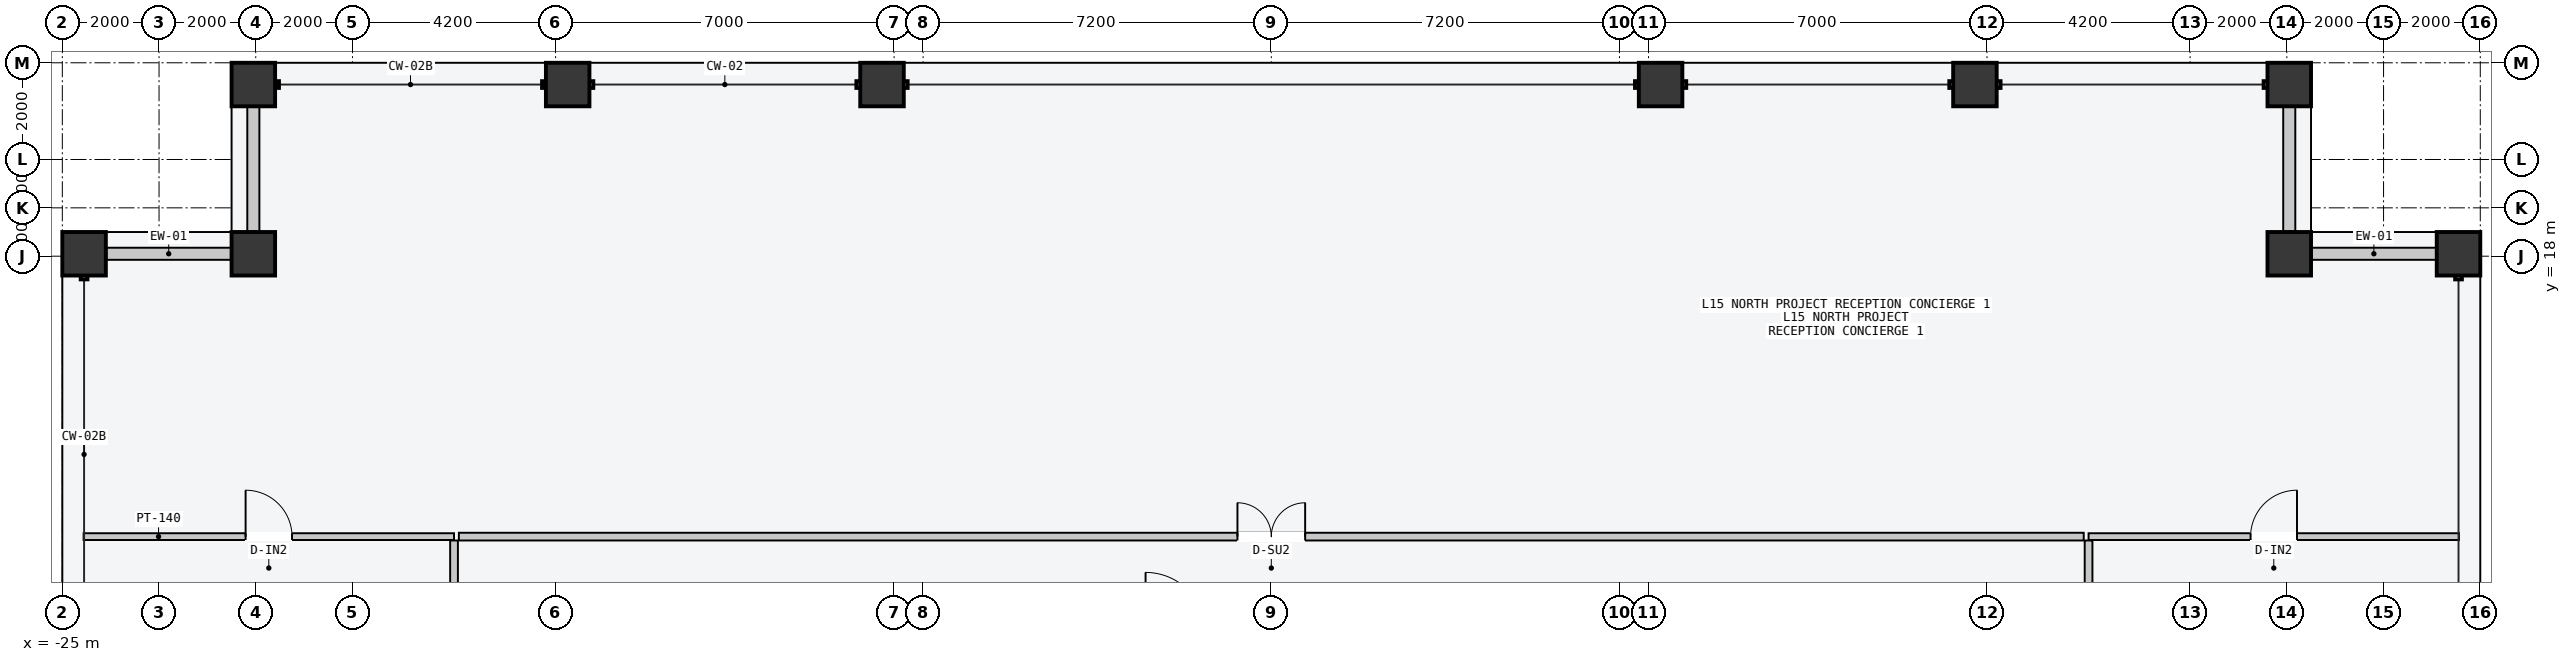
"""IFC4 building model, lengths in metres.
Left out: names, types, materials, properties, quantities, classifications, styles, units other than length and angle.
Written with IfcOpenShell. Run it as: python <this file> out.ifc"""

import sys

from ifc_helpers import new_model, si_unit, direction, frame, frame_2d, origin, origin_2d, place, context, subcontext, project, spatial, rectangle, hollow_rectangle, extrude, element, fill, save


model = new_model("IFC4")
c1 = context("Model", 3, precision=1e-05, world=origin(), true_north=direction((0.0, 1.0)))
c2 = subcontext(c1, "Body", "Model", "MODEL_VIEW")
j1 = project(units=[si_unit("LENGTHUNIT", "METRE"), si_unit("PLANEANGLEUNIT", "RADIAN")], contexts=[c1])
p1 = place(None, origin())
s1 = spatial("IfcSite", under=j1, at=p1, CompositionType="ELEMENT")
p2 = place(p1, origin())
s2 = spatial("IfcBuilding", under=s1, at=p2, CompositionType="ELEMENT")
p3 = place(p2, frame((0.0, 0.0, 60.0)))
s3 = spatial("IfcBuildingStorey", under=s2, at=p3, CompositionType="ELEMENT", Elevation=60.0)
for number, where, z_axis, x_axis in (
    (1, (-21.05, 21.55, 0.0), (0.0, 0.0, 1.0), (1.0, 0.0, 0.0)),
    (2, (-14.55, 21.55, 0.0), (0.0, 0.0, 1.0), (1.0, 0.0, 0.0)),
    (3, (-8.05, 21.55, 0.0), (0.0, 0.0, 1.0), (1.0, 0.0, 0.0)),
    (4, (8.05, 21.55, 0.0), (0.0, 0.0, 1.0), (1.0, 0.0, 0.0)),
    (5, (14.55, 21.55, 0.0), (0.0, 0.0, 1.0), (1.0, 0.0, 0.0)),
    (6, (21.05, 21.55, 0.0), (0.0, 0.0, 1.0), (1.0, 0.0, 0.0)),
    (7, (-24.55, 18.05, 0.0), (0.0, 0.0, 1.0), (0.0, 1.0, 0.0)),
    (8, (24.55, 18.05, 0.0), (0.0, 0.0, 1.0), (0.0, 1.0, 0.0)),
    (9, (-21.05, 18.05, 0.0), (0.0, 0.0, 1.0), (1.0, 0.0, 0.0)),
    (10, (21.05, 18.05, 0.0), (0.0, 0.0, 1.0), (1.0, 0.0, 0.0)),
):
    element("IfcColumn", number, at=place(p3, frame(where, z_axis=z_axis, x_axis=x_axis)), inside=s3, PredefinedType="COLUMN", context=c2, shape_type="SweptSolid", body=[
        extrude(hollow_rectangle(XDim=0.9, YDim=0.9, WallThickness=0.045, at=origin_2d()), origin(), (0.0, 0.0, 1.0), 3.6),
    ])
for number, where, z_axis, x_axis in (
    (11, (-24.09, 18.05, 0.0), (0.0, 0.0, 1.0), (1.0, 0.0, 0.0)),
    (12, (-21.05, 18.51, 0.0), (0.0, 0.0, 1.0), (0.0, 1.0, 0.0)),
    (13, (21.51, 18.05, 0.0), (0.0, 0.0, 1.0), (1.0, 0.0, 0.0)),
    (14, (21.05, 18.51, 0.0), (0.0, 0.0, 1.0), (0.0, 1.0, 0.0)),
):
    element("IfcWall", number, at=place(p3, frame(where, z_axis=z_axis, x_axis=x_axis)), inside=s3, PredefinedType="STANDARD", context=c2, shape_type="SweptSolid", body=[
        extrude(rectangle(XDim=2.58, YDim=0.25, at=frame_2d((1.29, 0.0))), origin(), (0.0, 0.0, 1.0), 2.7),
    ])
p4 = place(p3, frame((-16.8, 12.2, 0.0), z_axis=(0.0, 0.0, 1.0), x_axis=(1.0, 0.0, 0.0)))
e15 = element("IfcWall", 15, at=p4, inside=s3, PredefinedType="PARTITIONING", context=c2, shape_type="SweptSolid", body=[
    extrude(rectangle(XDim=33.6, YDim=0.16, at=frame_2d((16.8, 0.0))), origin(), (0.0, 0.0, 1.0), 3.4),
])
p5 = place(p4, frame((16.1, 0.0, 0.0)))
e16 = element("IfcOpeningElement", 16, at=p5, cuts=e15, PredefinedType="OPENING", context=c2, shape_type="SweptSolid", body=[
    extrude(rectangle(XDim=1.4, YDim=2.2, at=frame_2d((0.7, 1.1))), frame((0.0, 0.09, 0.0), z_axis=(0.0, -1.0, 0.0), x_axis=(1.0, 0.0, 0.0)), (0.0, 0.0, 1.0), 0.18),
])
p6 = place(p3, frame((-24.56, 12.2, 0.0), z_axis=(0.0, 0.0, 1.0), x_axis=(1.0, 0.0, 0.0)))
e17 = element("IfcWall", 17, at=p6, inside=s3, PredefinedType="PARTITIONING", context=c2, shape_type="SweptSolid", body=[
    extrude(rectangle(XDim=7.66, YDim=0.14, at=frame_2d((3.83, 0.0))), origin(), (0.0, 0.0, 1.0), 3.4),
])
p7 = place(p6, frame((3.35, 0.0, 0.0)))
e18 = element("IfcOpeningElement", 18, at=p7, cuts=e17, PredefinedType="OPENING", context=c2, shape_type="SweptSolid", body=[
    extrude(rectangle(XDim=0.96, YDim=2.18, at=frame_2d((0.48, 1.09))), frame((0.0, 0.08, 0.0), z_axis=(0.0, -1.0, 0.0), x_axis=(1.0, 0.0, 0.0)), (0.0, 0.0, 1.0), 0.16),
])
p8 = place(p3, frame((16.9, 12.2, 0.0), z_axis=(0.0, 0.0, 1.0), x_axis=(1.0, 0.0, 0.0)))
e19 = element("IfcWall", 19, at=p8, inside=s3, PredefinedType="PARTITIONING", context=c2, shape_type="SweptSolid", body=[
    extrude(rectangle(XDim=7.66, YDim=0.14, at=frame_2d((3.83, 0.0))), origin(), (0.0, 0.0, 1.0), 3.4),
])
p9 = place(p8, frame((3.35, 0.0, 0.0)))
e20 = element("IfcOpeningElement", 20, at=p9, cuts=e19, PredefinedType="OPENING", context=c2, shape_type="SweptSolid", body=[
    extrude(rectangle(XDim=0.96, YDim=2.18, at=frame_2d((0.48, 1.09))), frame((0.0, 0.08, 0.0), z_axis=(0.0, -1.0, 0.0), x_axis=(1.0, 0.0, 0.0)), (0.0, 0.0, 1.0), 0.16),
])
p10 = place(p3, frame((-16.9, -14.42, 0.0), z_axis=(0.0, 0.0, 1.0), x_axis=(0.0, 1.0, 0.0)))
e21 = element("IfcWall", 21, at=p10, inside=s3, PredefinedType="PARTITIONING", context=c2, shape_type="SweptSolid", body=[
    extrude(rectangle(XDim=26.54, YDim=0.16, at=frame_2d((13.27, 0.0))), origin(), (0.0, 0.0, 1.0), 3.4),
])
p11 = place(p10, frame((5.123, 0.0, 0.0)))
e22 = element("IfcOpeningElement", 22, at=p11, cuts=e21, PredefinedType="OPENING", context=c2, shape_type="SweptSolid", body=[
    extrude(rectangle(XDim=0.9, YDim=2.15, at=frame_2d((0.45, 1.075))), frame((0.0, 0.09, 0.0), z_axis=(0.0, -1.0, 0.0), x_axis=(1.0, 0.0, 0.0)), (0.0, 0.0, 1.0), 0.18),
])
p12 = place(p10, frame((18.363, 0.0, 0.0)))
e23 = element("IfcOpeningElement", 23, at=p12, cuts=e21, PredefinedType="OPENING", context=c2, shape_type="SweptSolid", body=[
    extrude(rectangle(XDim=0.96, YDim=2.18, at=frame_2d((0.48, 1.09))), frame((0.0, 0.09, 0.0), z_axis=(0.0, -1.0, 0.0), x_axis=(1.0, 0.0, 0.0)), (0.0, 0.0, 1.0), 0.18),
])
p13 = place(p3, frame((16.9, -14.42, 0.0), z_axis=(0.0, 0.0, 1.0), x_axis=(0.0, 1.0, 0.0)))
e24 = element("IfcWall", 24, at=p13, inside=s3, PredefinedType="PARTITIONING", context=c2, shape_type="SweptSolid", body=[
    extrude(rectangle(XDim=26.54, YDim=0.16, at=frame_2d((13.27, 0.0))), origin(), (0.0, 0.0, 1.0), 3.4),
])
p14 = place(p13, frame((2.602, 0.0, 0.0)))
e25 = element("IfcOpeningElement", 25, at=p14, cuts=e24, PredefinedType="OPENING", context=c2, shape_type="SweptSolid", body=[
    extrude(rectangle(XDim=0.9, YDim=2.15, at=frame_2d((0.45, 1.075))), frame((0.0, 0.09, 0.0), z_axis=(0.0, -1.0, 0.0), x_axis=(1.0, 0.0, 0.0)), (0.0, 0.0, 1.0), 0.18),
])
p15 = place(p13, frame((10.136, 0.0, 0.0)))
e26 = element("IfcOpeningElement", 26, at=p15, cuts=e24, PredefinedType="OPENING", context=c2, shape_type="SweptSolid", body=[
    extrude(rectangle(XDim=0.96, YDim=2.18, at=frame_2d((0.48, 1.09))), frame((0.0, 0.09, 0.0), z_axis=(0.0, -1.0, 0.0), x_axis=(1.0, 0.0, 0.0)), (0.0, 0.0, 1.0), 0.18),
])
p16 = place(p13, frame((20.324, 0.0, 0.0)))
e27 = element("IfcOpeningElement", 27, at=p16, cuts=e24, PredefinedType="OPENING", context=c2, shape_type="SweptSolid", body=[
    extrude(rectangle(XDim=1.02, YDim=2.2, at=frame_2d((0.51, 1.1))), frame((0.0, 0.09, 0.0), z_axis=(0.0, -1.0, 0.0), x_axis=(1.0, 0.0, 0.0)), (0.0, 0.0, 1.0), 0.18),
])
p17 = place(p5, origin())
e28 = element("IfcDoor", 28, at=p17, inside=s3, OperationType="DOUBLE_DOOR_SINGLE_SWING", PredefinedType="DOOR", context=c2, shape_type="SweptSolid", body=[
    extrude(rectangle(XDim=1.4, YDim=2.2, at=frame_2d((0.7, 1.1))), frame((0.0, 0.025, 0.0), z_axis=(0.0, -1.0, 0.0), x_axis=(1.0, 0.0, 0.0)), (0.0, 0.0, 1.0), 0.05),
])
fill(e16, e28)
p18 = place(p7, origin())
e29 = element("IfcDoor", 29, at=p18, inside=s3, OperationType="SINGLE_SWING_LEFT", PredefinedType="DOOR", context=c2, shape_type="SweptSolid", body=[
    extrude(rectangle(XDim=0.96, YDim=2.18, at=frame_2d((0.48, 1.09))), frame((0.0, 0.025, 0.0), z_axis=(0.0, -1.0, 0.0), x_axis=(1.0, 0.0, 0.0)), (0.0, 0.0, 1.0), 0.05),
])
fill(e18, e29)
p19 = place(p9, origin())
e30 = element("IfcDoor", 30, at=p19, inside=s3, OperationType="SINGLE_SWING_RIGHT", PredefinedType="DOOR", context=c2, shape_type="SweptSolid", body=[
    extrude(rectangle(XDim=0.96, YDim=2.18, at=frame_2d((0.48, 1.09))), frame((0.0, 0.025, 0.0), z_axis=(0.0, -1.0, 0.0), x_axis=(1.0, 0.0, 0.0)), (0.0, 0.0, 1.0), 0.05),
])
fill(e20, e30)
save(model, sys.argv[1])
